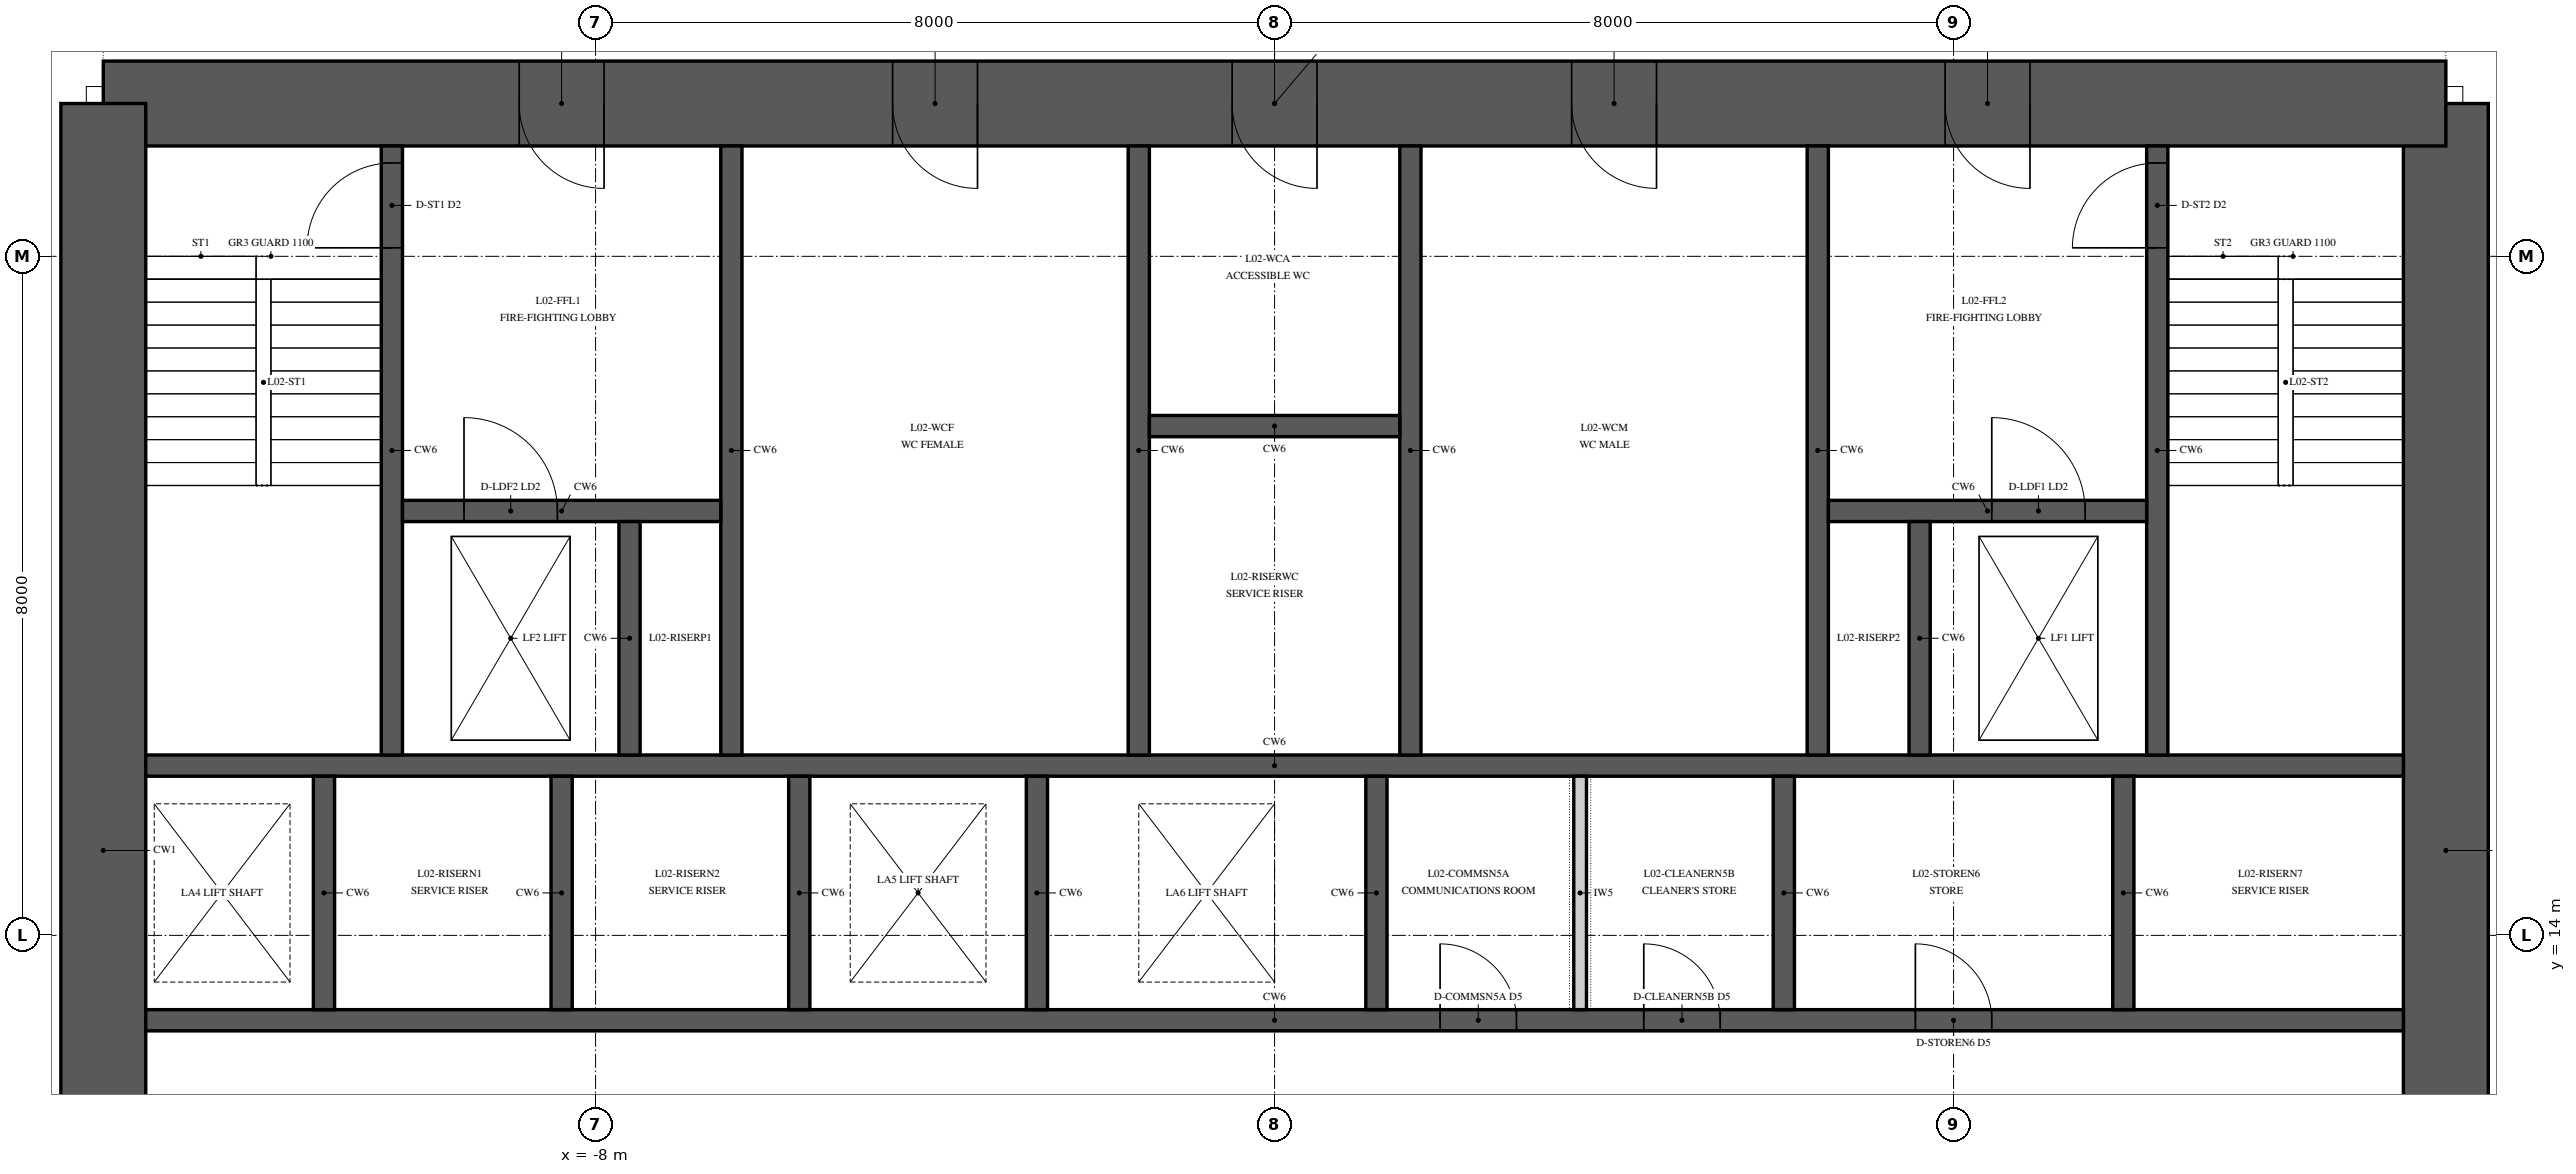
"""IFC4 building model, lengths in metres.
Left out: names, types, materials, properties, quantities, classifications, styles, units other than length and angle.
Written with IfcOpenShell. Run it as: python <this file> out.ifc"""

import sys

from ifc_helpers import new_model, si_unit, direction, frame, frame_2d, origin, place, context, subcontext, project, spatial, polyline, rectangle, outline, extrude, element, fill, save


model = new_model("IFC4")
c1 = context("Model", 3, precision=1e-05, world=origin(), true_north=direction((0.0, 1.0)))
c2 = subcontext(c1, "Body", "Model", "MODEL_VIEW")
j1 = project(units=[si_unit("LENGTHUNIT", "METRE"), si_unit("PLANEANGLEUNIT", "RADIAN")], contexts=[c1])
p1 = place(None, origin())
s1 = spatial("IfcSite", under=j1, at=p1, CompositionType="ELEMENT")
p2 = place(p1, origin())
s2 = spatial("IfcBuilding", under=s1, at=p2, CompositionType="ELEMENT")
p3 = place(p2, frame((0.0, 0.0, 12.0)))
s3 = spatial("IfcBuildingStorey", under=s2, at=p3, CompositionType="ELEMENT", Elevation=12.0)
p4 = place(p3, frame((13.8, 6.2, 0.0), z_axis=(0.0, 0.0, 1.0), x_axis=(0.0, 1.0, 0.0)))
e1 = element("IfcWall", 1, at=p4, inside=s3, PredefinedType="SHEAR", context=c2, shape_type="SweptSolid", body=[
    extrude(outline(polyline([(0.0, -0.5), (17.6, -0.5), (17.6, 0.0), (17.1, 0.0), (17.1, 0.5), (0.5, 0.5), (0.5, 0.0), (0.0, 0.0), (0.0, -0.5)])), origin(), (0.0, 0.0, 1.0), 7.0),
])
p5 = place(p4, frame((4.1, 0.0, 0.0)))
e2 = element("IfcOpeningElement", 2, at=p5, cuts=e1, PredefinedType="OPENING", context=c2, shape_type="SweptSolid", body=[
    extrude(rectangle(XDim=1.8, YDim=2.4, at=frame_2d((0.9, 1.2))), frame((0.0, 0.515, 0.0), z_axis=(0.0, -1.0, 0.0), x_axis=(1.0, 0.0, 0.0)), (0.0, 0.0, 1.0), 1.03),
])
p6 = place(p3, frame((13.8, 23.8, 0.0), z_axis=(0.0, 0.0, 1.0), x_axis=(-1.0, 0.0, 0.0)))
e3 = element("IfcWall", 3, at=p6, inside=s3, PredefinedType="SHEAR", context=c2, shape_type="SweptSolid", body=[
    extrude(rectangle(XDim=27.6, YDim=1.0, at=frame_2d((13.8, 0.0))), origin(), (0.0, 0.0, 1.0), 7.0),
])
p7 = place(p6, frame((21.7, 0.0, 0.0)))
e4 = element("IfcOpeningElement", 4, at=p7, cuts=e3, PredefinedType="OPENING", context=c2, shape_type="SweptSolid", body=[
    extrude(rectangle(XDim=1.0, YDim=2.1, at=frame_2d((0.5, 1.05))), frame((0.0, 0.515, 0.0), z_axis=(0.0, -1.0, 0.0), x_axis=(1.0, 0.0, 0.0)), (0.0, 0.0, 1.0), 1.03),
])
p8 = place(p6, frame((4.9, 0.0, 0.0)))
e5 = element("IfcOpeningElement", 5, at=p8, cuts=e3, PredefinedType="OPENING", context=c2, shape_type="SweptSolid", body=[
    extrude(rectangle(XDim=1.0, YDim=2.1, at=frame_2d((0.5, 1.05))), frame((0.0, 0.515, 0.0), z_axis=(0.0, -1.0, 0.0), x_axis=(1.0, 0.0, 0.0)), (0.0, 0.0, 1.0), 1.03),
])
p9 = place(p6, frame((17.3, 0.0, 0.0)))
e6 = element("IfcOpeningElement", 6, at=p9, cuts=e3, PredefinedType="OPENING", context=c2, shape_type="SweptSolid", body=[
    extrude(rectangle(XDim=1.0, YDim=2.1, at=frame_2d((0.5, 1.05))), frame((0.0, 0.515, 0.0), z_axis=(0.0, -1.0, 0.0), x_axis=(1.0, 0.0, 0.0)), (0.0, 0.0, 1.0), 1.03),
])
p10 = place(p6, frame((13.3, 0.0, 0.0)))
e7 = element("IfcOpeningElement", 7, at=p10, cuts=e3, PredefinedType="OPENING", context=c2, shape_type="SweptSolid", body=[
    extrude(rectangle(XDim=1.0, YDim=2.1, at=frame_2d((0.5, 1.05))), frame((0.0, 0.515, 0.0), z_axis=(0.0, -1.0, 0.0), x_axis=(1.0, 0.0, 0.0)), (0.0, 0.0, 1.0), 1.03),
])
p11 = place(p6, frame((9.3, 0.0, 0.0)))
e8 = element("IfcOpeningElement", 8, at=p11, cuts=e3, PredefinedType="OPENING", context=c2, shape_type="SweptSolid", body=[
    extrude(rectangle(XDim=1.0, YDim=2.1, at=frame_2d((0.5, 1.05))), frame((0.0, 0.515, 0.0), z_axis=(0.0, -1.0, 0.0), x_axis=(1.0, 0.0, 0.0)), (0.0, 0.0, 1.0), 1.03),
])
p12 = place(p3, frame((-13.8, 23.8, 0.0), z_axis=(0.0, 0.0, 1.0), x_axis=(0.0, -1.0, 0.0)))
e9 = element("IfcWall", 9, at=p12, inside=s3, PredefinedType="SHEAR", context=c2, shape_type="SweptSolid", body=[
    extrude(outline(polyline([(0.0, -0.5), (17.6, -0.5), (17.6, 0.0), (17.1, 0.0), (17.1, 0.5), (0.5, 0.5), (0.5, 0.0), (0.0, 0.0), (0.0, -0.5)])), origin(), (0.0, 0.0, 1.0), 7.0),
])
p13 = place(p12, frame((11.7, 0.0, 0.0)))
e10 = element("IfcOpeningElement", 10, at=p13, cuts=e9, PredefinedType="OPENING", context=c2, shape_type="SweptSolid", body=[
    extrude(rectangle(XDim=1.8, YDim=2.4, at=frame_2d((0.9, 1.2))), frame((0.0, 0.515, 0.0), z_axis=(0.0, -1.0, 0.0), x_axis=(1.0, 0.0, 0.0)), (0.0, 0.0, 1.0), 1.03),
])
p14 = place(p3, frame((-13.3, 13.0, 0.0), z_axis=(0.0, 0.0, 1.0), x_axis=(1.0, 0.0, 0.0)))
e11 = element("IfcWall", 11, at=p14, inside=s3, PredefinedType="SHEAR", context=c2, shape_type="SweptSolid", body=[
    extrude(rectangle(XDim=26.6, YDim=0.25, at=frame_2d((13.3, 0.0))), origin(), (0.0, 0.0, 1.0), 7.0),
])
p15 = place(p14, frame((15.25, 0.0, 0.0)))
e12 = element("IfcOpeningElement", 12, at=p15, cuts=e11, PredefinedType="OPENING", context=c2, shape_type="SweptSolid", body=[
    extrude(rectangle(XDim=0.9, YDim=2.1, at=frame_2d((0.45, 1.05))), frame((0.0, 0.14, 0.0), z_axis=(0.0, -1.0, 0.0), x_axis=(1.0, 0.0, 0.0)), (0.0, 0.0, 1.0), 0.28),
])
p16 = place(p14, frame((17.65, 0.0, 0.0)))
e13 = element("IfcOpeningElement", 13, at=p16, cuts=e11, PredefinedType="OPENING", context=c2, shape_type="SweptSolid", body=[
    extrude(rectangle(XDim=0.9, YDim=2.1, at=frame_2d((0.45, 1.05))), frame((0.0, 0.14, 0.0), z_axis=(0.0, -1.0, 0.0), x_axis=(1.0, 0.0, 0.0)), (0.0, 0.0, 1.0), 0.28),
])
p17 = place(p14, frame((20.85, 0.0, 0.0)))
e14 = element("IfcOpeningElement", 14, at=p17, cuts=e11, PredefinedType="OPENING", context=c2, shape_type="SweptSolid", body=[
    extrude(rectangle(XDim=0.9, YDim=2.1, at=frame_2d((0.45, 1.05))), frame((0.0, 0.14, 0.0), z_axis=(0.0, -1.0, 0.0), x_axis=(1.0, 0.0, 0.0)), (0.0, 0.0, 1.0), 0.28),
])
p18 = place(p3, frame((-13.3, 16.0, 0.0), z_axis=(0.0, 0.0, 1.0), x_axis=(1.0, 0.0, 0.0)))
e15 = element("IfcWall", 15, at=p18, inside=s3, PredefinedType="SHEAR", context=c2, shape_type="SweptSolid", body=[
    extrude(rectangle(XDim=26.6, YDim=0.25, at=frame_2d((13.3, 0.0))), origin(), (0.0, 0.0, 1.0), 7.0),
])
for number, where, z_axis, x_axis in (
    (16, (-11.2, 13.125, 0.0), (0.0, 0.0, 1.0), (0.0, 1.0, 0.0)),
    (17, (-8.4, 13.125, 0.0), (0.0, 0.0, 1.0), (0.0, 1.0, 0.0)),
    (18, (-5.6, 13.125, 0.0), (0.0, 0.0, 1.0), (0.0, 1.0, 0.0)),
    (19, (-2.8, 13.125, 0.0), (0.0, 0.0, 1.0), (0.0, 1.0, 0.0)),
    (20, (1.2, 13.125, 0.0), (0.0, 0.0, 1.0), (0.0, 1.0, 0.0)),
    (21, (6.0, 13.125, 0.0), (0.0, 0.0, 1.0), (0.0, 1.0, 0.0)),
    (22, (10.0, 13.125, 0.0), (0.0, 0.0, 1.0), (0.0, 1.0, 0.0)),
):
    element("IfcWall", number, at=place(p3, frame(where, z_axis=z_axis, x_axis=x_axis)), inside=s3, PredefinedType="SHEAR", context=c2, shape_type="SweptSolid", body=[
        extrude(rectangle(XDim=2.75, YDim=0.25, at=frame_2d((1.375, 0.0))), origin(), (0.0, 0.0, 1.0), 7.0),
    ])
p19 = place(p3, frame((-10.4, 16.125, 0.0), z_axis=(0.0, 0.0, 1.0), x_axis=(0.0, 1.0, 0.0)))
e23 = element("IfcWall", 23, at=p19, inside=s3, PredefinedType="SHEAR", context=c2, shape_type="SweptSolid", body=[
    extrude(rectangle(XDim=7.175, YDim=0.25, at=frame_2d((3.587, 0.0))), origin(), (0.0, 0.0, 1.0), 7.0),
])
p20 = place(p19, frame((5.975, 0.0, 0.0)))
e24 = element("IfcOpeningElement", 24, at=p20, cuts=e23, PredefinedType="OPENING", context=c2, shape_type="SweptSolid", body=[
    extrude(rectangle(XDim=1.0, YDim=2.1, at=frame_2d((0.5, 1.05))), frame((0.0, 0.14, 0.0), z_axis=(0.0, -1.0, 0.0), x_axis=(1.0, 0.0, 0.0)), (0.0, 0.0, 1.0), 0.28),
])
for number, where, z_axis, x_axis in (
    (25, (-6.4, 16.125, 0.0), (0.0, 0.0, 1.0), (0.0, 1.0, 0.0)),
    (26, (-1.6, 16.125, 0.0), (0.0, 0.0, 1.0), (0.0, 1.0, 0.0)),
    (27, (1.6, 16.125, 0.0), (0.0, 0.0, 1.0), (0.0, 1.0, 0.0)),
    (28, (6.4, 16.125, 0.0), (0.0, 0.0, 1.0), (0.0, 1.0, 0.0)),
):
    element("IfcWall", number, at=place(p3, frame(where, z_axis=z_axis, x_axis=x_axis)), inside=s3, PredefinedType="SHEAR", context=c2, shape_type="SweptSolid", body=[
        extrude(rectangle(XDim=7.175, YDim=0.25, at=frame_2d((3.587, 0.0))), origin(), (0.0, 0.0, 1.0), 7.0),
    ])
p21 = place(p3, frame((10.4, 16.125, 0.0), z_axis=(0.0, 0.0, 1.0), x_axis=(0.0, 1.0, 0.0)))
e29 = element("IfcWall", 29, at=p21, inside=s3, PredefinedType="SHEAR", context=c2, shape_type="SweptSolid", body=[
    extrude(rectangle(XDim=7.175, YDim=0.25, at=frame_2d((3.587, 0.0))), origin(), (0.0, 0.0, 1.0), 7.0),
])
p22 = place(p21, frame((5.975, 0.0, 0.0)))
e30 = element("IfcOpeningElement", 30, at=p22, cuts=e29, PredefinedType="OPENING", context=c2, shape_type="SweptSolid", body=[
    extrude(rectangle(XDim=1.0, YDim=2.1, at=frame_2d((0.5, 1.05))), frame((0.0, 0.14, 0.0), z_axis=(0.0, -1.0, 0.0), x_axis=(1.0, 0.0, 0.0)), (0.0, 0.0, 1.0), 0.28),
])
p23 = place(p3, frame((-10.275, 19.0, 0.0), z_axis=(0.0, 0.0, 1.0), x_axis=(1.0, 0.0, 0.0)))
e31 = element("IfcWall", 31, at=p23, inside=s3, PredefinedType="SHEAR", context=c2, shape_type="SweptSolid", body=[
    extrude(rectangle(XDim=3.75, YDim=0.25, at=frame_2d((1.875, 0.0))), origin(), (0.0, 0.0, 1.0), 7.0),
])
p24 = place(p23, frame((0.725, 0.0, 0.0)))
e32 = element("IfcOpeningElement", 32, at=p24, cuts=e31, PredefinedType="OPENING", context=c2, shape_type="SweptSolid", body=[
    extrude(rectangle(XDim=1.1, YDim=2.1, at=frame_2d((0.55, 1.05))), frame((0.0, 0.14, 0.0), z_axis=(0.0, -1.0, 0.0), x_axis=(1.0, 0.0, 0.0)), (0.0, 0.0, 1.0), 0.28),
])
p25 = place(p3, frame((6.525, 19.0, 0.0), z_axis=(0.0, 0.0, 1.0), x_axis=(1.0, 0.0, 0.0)))
e33 = element("IfcWall", 33, at=p25, inside=s3, PredefinedType="SHEAR", context=c2, shape_type="SweptSolid", body=[
    extrude(rectangle(XDim=3.75, YDim=0.25, at=frame_2d((1.875, 0.0))), origin(), (0.0, 0.0, 1.0), 7.0),
])
p26 = place(p25, frame((1.925, 0.0, 0.0)))
e34 = element("IfcOpeningElement", 34, at=p26, cuts=e33, PredefinedType="OPENING", context=c2, shape_type="SweptSolid", body=[
    extrude(rectangle(XDim=1.1, YDim=2.1, at=frame_2d((0.55, 1.05))), frame((0.0, 0.14, 0.0), z_axis=(0.0, -1.0, 0.0), x_axis=(1.0, 0.0, 0.0)), (0.0, 0.0, 1.0), 0.28),
])
for number, where, z_axis, x_axis in (
    (35, (-7.6, 16.125, 0.0), (0.0, 0.0, 1.0), (0.0, 1.0, 0.0)),
    (36, (7.6, 16.125, 0.0), (0.0, 0.0, 1.0), (0.0, 1.0, 0.0)),
):
    element("IfcWall", number, at=place(p3, frame(where, z_axis=z_axis, x_axis=x_axis)), inside=s3, PredefinedType="SHEAR", context=c2, shape_type="SweptSolid", body=[
        extrude(rectangle(XDim=2.75, YDim=0.25, at=frame_2d((1.375, 0.0))), origin(), (0.0, 0.0, 1.0), 7.0),
    ])
p27 = place(p3, frame((-1.475, 20.0, 0.0), z_axis=(0.0, 0.0, 1.0), x_axis=(1.0, 0.0, 0.0)))
e37 = element("IfcWall", 37, at=p27, inside=s3, PredefinedType="SHEAR", context=c2, shape_type="SweptSolid", body=[
    extrude(rectangle(XDim=2.95, YDim=0.25, at=frame_2d((1.475, 0.0))), origin(), (0.0, 0.0, 1.0), 7.0),
])
p28 = place(p3, frame((3.6, 13.125, 0.0), z_axis=(0.0, 0.0, 1.0), x_axis=(0.0, 1.0, 0.0)))
e38 = element("IfcWall", 38, at=p28, inside=s3, PredefinedType="PARTITIONING", context=c2, shape_type="SweptSolid", body=[
    extrude(rectangle(XDim=2.75, YDim=0.15, at=frame_2d((1.375, 0.0))), origin(), (0.0, 0.0, 1.0), 6.85),
])
p29 = place(p7, origin())
e39 = element("IfcDoor", 39, at=p29, inside=s3, OperationType="SINGLE_SWING_RIGHT", PredefinedType="DOOR", context=c2, shape_type="SweptSolid", body=[
    extrude(rectangle(XDim=1.0, YDim=2.1, at=frame_2d((0.5, 1.05))), frame((0.0, 0.5, 0.0), z_axis=(0.0, -1.0, 0.0), x_axis=(1.0, 0.0, 0.0)), (0.0, 0.0, 1.0), 1.0),
])
fill(e4, e39)
p30 = place(p8, origin())
e40 = element("IfcDoor", 40, at=p30, inside=s3, OperationType="SINGLE_SWING_RIGHT", PredefinedType="DOOR", context=c2, shape_type="SweptSolid", body=[
    extrude(rectangle(XDim=1.0, YDim=2.1, at=frame_2d((0.5, 1.05))), frame((0.0, 0.5, 0.0), z_axis=(0.0, -1.0, 0.0), x_axis=(1.0, 0.0, 0.0)), (0.0, 0.0, 1.0), 1.0),
])
fill(e5, e40)
p31 = place(p9, origin())
e41 = element("IfcDoor", 41, at=p31, inside=s3, OperationType="SINGLE_SWING_LEFT", PredefinedType="DOOR", context=c2, shape_type="SweptSolid", body=[
    extrude(rectangle(XDim=1.0, YDim=2.1, at=frame_2d((0.5, 1.05))), frame((0.0, 0.5, 0.0), z_axis=(0.0, -1.0, 0.0), x_axis=(1.0, 0.0, 0.0)), (0.0, 0.0, 1.0), 1.0),
])
fill(e6, e41)
p32 = place(p10, origin())
e42 = element("IfcDoor", 42, at=p32, inside=s3, OperationType="SINGLE_SWING_LEFT", PredefinedType="DOOR", context=c2, shape_type="SweptSolid", body=[
    extrude(rectangle(XDim=1.0, YDim=2.1, at=frame_2d((0.5, 1.05))), frame((0.0, 0.5, 0.0), z_axis=(0.0, -1.0, 0.0), x_axis=(1.0, 0.0, 0.0)), (0.0, 0.0, 1.0), 1.0),
])
fill(e7, e42)
p33 = place(p11, origin())
e43 = element("IfcDoor", 43, at=p33, inside=s3, OperationType="SINGLE_SWING_LEFT", PredefinedType="DOOR", context=c2, shape_type="SweptSolid", body=[
    extrude(rectangle(XDim=1.0, YDim=2.1, at=frame_2d((0.5, 1.05))), frame((0.0, 0.5, 0.0), z_axis=(0.0, -1.0, 0.0), x_axis=(1.0, 0.0, 0.0)), (0.0, 0.0, 1.0), 1.0),
])
fill(e8, e43)
p34 = place(p20, origin())
e44 = element("IfcDoor", 44, at=p34, inside=s3, OperationType="SINGLE_SWING_LEFT", PredefinedType="DOOR", context=c2, shape_type="SweptSolid", body=[
    extrude(rectangle(XDim=1.0, YDim=2.1, at=frame_2d((0.5, 1.05))), frame((0.0, 0.125, 0.0), z_axis=(0.0, -1.0, 0.0), x_axis=(1.0, 0.0, 0.0)), (0.0, 0.0, 1.0), 0.25),
])
fill(e24, e44)
p35 = place(p22, origin())
e45 = element("IfcDoor", 45, at=p35, inside=s3, OperationType="SINGLE_SWING_LEFT", PredefinedType="DOOR", context=c2, shape_type="SweptSolid", body=[
    extrude(rectangle(XDim=1.0, YDim=2.1, at=frame_2d((0.5, 1.05))), frame((0.0, 0.125, 0.0), z_axis=(0.0, -1.0, 0.0), x_axis=(1.0, 0.0, 0.0)), (0.0, 0.0, 1.0), 0.25),
])
fill(e30, e45)
p36 = place(p26, origin())
e46 = element("IfcDoor", 46, at=p36, inside=s3, OperationType="SLIDING_TO_RIGHT", PredefinedType="DOOR", context=c2, shape_type="SweptSolid", body=[
    extrude(rectangle(XDim=1.1, YDim=2.1, at=frame_2d((0.55, 1.05))), frame((0.0, 0.125, 0.0), z_axis=(0.0, -1.0, 0.0), x_axis=(1.0, 0.0, 0.0)), (0.0, 0.0, 1.0), 0.25),
])
fill(e34, e46)
p37 = place(p24, origin())
e47 = element("IfcDoor", 47, at=p37, inside=s3, OperationType="SLIDING_TO_RIGHT", PredefinedType="DOOR", context=c2, shape_type="SweptSolid", body=[
    extrude(rectangle(XDim=1.1, YDim=2.1, at=frame_2d((0.55, 1.05))), frame((0.0, 0.125, 0.0), z_axis=(0.0, -1.0, 0.0), x_axis=(1.0, 0.0, 0.0)), (0.0, 0.0, 1.0), 0.25),
])
fill(e32, e47)
p38 = place(p15, origin())
e48 = element("IfcDoor", 48, at=p38, inside=s3, OperationType="SINGLE_SWING_LEFT", PredefinedType="DOOR", context=c2, shape_type="SweptSolid", body=[
    extrude(rectangle(XDim=0.9, YDim=2.1, at=frame_2d((0.45, 1.05))), frame((0.0, 0.125, 0.0), z_axis=(0.0, -1.0, 0.0), x_axis=(1.0, 0.0, 0.0)), (0.0, 0.0, 1.0), 0.25),
])
fill(e12, e48)
p39 = place(p16, origin())
e49 = element("IfcDoor", 49, at=p39, inside=s3, OperationType="SINGLE_SWING_LEFT", PredefinedType="DOOR", context=c2, shape_type="SweptSolid", body=[
    extrude(rectangle(XDim=0.9, YDim=2.1, at=frame_2d((0.45, 1.05))), frame((0.0, 0.125, 0.0), z_axis=(0.0, -1.0, 0.0), x_axis=(1.0, 0.0, 0.0)), (0.0, 0.0, 1.0), 0.25),
])
fill(e13, e49)
p40 = place(p17, origin())
e50 = element("IfcDoor", 50, at=p40, inside=s3, OperationType="SINGLE_SWING_LEFT", PredefinedType="DOOR", context=c2, shape_type="SweptSolid", body=[
    extrude(rectangle(XDim=0.9, YDim=2.1, at=frame_2d((0.45, 1.05))), frame((0.0, 0.125, 0.0), z_axis=(0.0, -1.0, 0.0), x_axis=(1.0, 0.0, 0.0)), (0.0, 0.0, 1.0), 0.25),
])
fill(e14, e50)
save(model, sys.argv[1])
